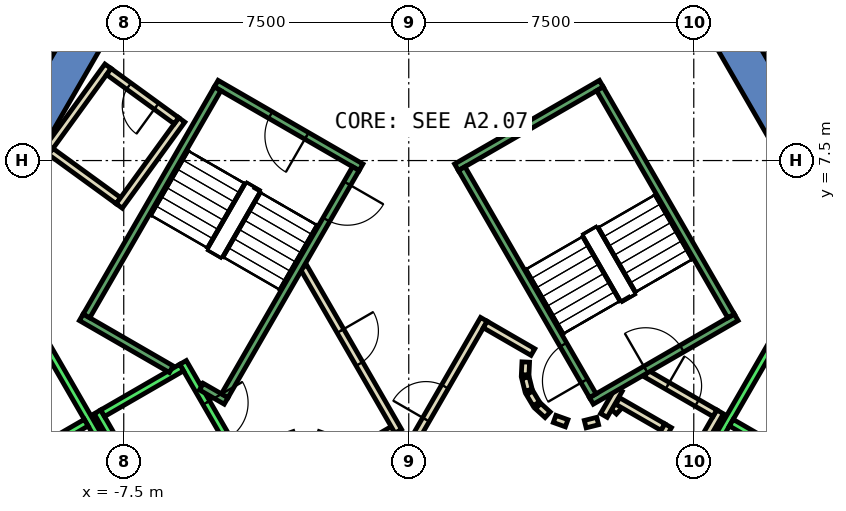
"""IFC4 building model, lengths in metres.
Left out: names, types, materials, properties, quantities, classifications, styles, units other than length and angle.
Written with IfcOpenShell. Run it as: python <this file> out.ifc"""

import sys

from ifc_helpers import new_model, si_unit, direction, frame, frame_2d, origin, place, context, subcontext, project, spatial, polyline, rectangle, outline, extrude, element, fill, save


model = new_model("IFC4")
c1 = context("Model", 3, precision=1e-05, world=origin(), true_north=direction((0.0, 1.0)))
c2 = subcontext(c1, "Body", "Model", "MODEL_VIEW")
j1 = project(units=[si_unit("LENGTHUNIT", "METRE"), si_unit("PLANEANGLEUNIT", "RADIAN")], contexts=[c1])
p1 = place(None, origin())
s1 = spatial("IfcSite", under=j1, at=p1, CompositionType="ELEMENT")
p2 = place(p1, origin())
s2 = spatial("IfcBuilding", under=s1, at=p2, CompositionType="ELEMENT")
p3 = place(p2, frame((0.0, 0.0, 20.0)))
s3 = spatial("IfcBuildingStorey", under=s2, at=p3, CompositionType="ELEMENT", Elevation=20.0)
p4 = place(p3, frame((0.0, 0.0, -0.45)))
e1 = element("IfcWall", 1, at=p4, inside=s3, PredefinedType="SHEAR", context=c2, shape_type="SweptSolid", body=[
    extrude(outline(polyline([(8.517, 11.748), (7.651, 11.248), (12.702, 2.5), (13.856, 2.5), (8.517, 11.748)])), origin(), (0.0, 0.0, 1.0), 5.0),
])
p5 = place(p3, frame((0.0, 0.0, -0.45)))
e2 = element("IfcWall", 2, at=p5, inside=s3, PredefinedType="SHEAR", context=c2, shape_type="SweptSolid", body=[
    extrude(outline(polyline([(-12.267, 5.252), (-11.402, 4.752), (-6.351, 13.5), (-6.928, 14.5), (-12.267, 5.252)])), origin(), (0.0, 0.0, 1.0), 5.0),
])
p6 = place(p3, frame((0.0, 0.0, -0.45)))
e3 = element("IfcWall", 3, at=p6, inside=s3, PredefinedType="SHEAR", context=c2, shape_type="SweptSolid", body=[
    extrude(outline(polyline([(-13.856, 2.5), (-6.928, -9.5), (-6.351, -8.5), (-12.702, 2.5), (-13.856, 2.5)])), origin(), (0.0, 0.0, 1.0), 5.0),
])
p7 = place(p3, frame((5.39, 0.898, 0.0), z_axis=(0.0, 0.0, 1.0), x_axis=(0.673828488714, 0.738887791073, 0.0)))
e4 = element("IfcWall", 4, at=p7, inside=s3, PredefinedType="PARTITIONING", context=c2, shape_type="SweptSolid", body=[
    extrude(rectangle(XDim=0.263, YDim=0.2, at=frame_2d((0.131, 0.0))), origin(), (0.0, 0.0, 1.0), 4.55),
])
p8 = place(p3, frame((5.499, 1.172, 0.0), z_axis=(0.0, 0.0, 1.0), x_axis=(0.866333505267, -0.499465972466, 0.0)))
e5 = element("IfcWall", 5, at=p8, inside=s3, PredefinedType="PARTITIONING", context=c2, shape_type="SweptSolid", body=[
    extrude(rectangle(XDim=1.374, YDim=0.2, at=frame_2d((0.687, 0.0))), origin(), (0.0, 0.0, 1.0), 4.55),
])
p9 = place(p3, frame((6.826, 0.522, 0.0), z_axis=(0.0, 0.0, 1.0), x_axis=(-0.500016722714, -0.866015748706, 0.0)))
e6 = element("IfcWall", 6, at=p9, inside=s3, PredefinedType="PARTITIONING", context=c2, shape_type="SweptSolid", body=[
    extrude(rectangle(XDim=1.7, YDim=0.2, at=frame_2d((0.85, 0.0))), origin(), (0.0, 0.0, 1.0), 4.55),
])
p10 = place(p3, frame((8.192, 0.888, 0.0), z_axis=(0.0, 0.0, 1.0), x_axis=(-0.499940625693, -0.866059680843, 0.0)))
e7 = element("IfcWall", 7, at=p10, inside=s3, PredefinedType="PARTITIONING", context=c2, shape_type="SweptSolid", body=[
    extrude(rectangle(XDim=2.68, YDim=0.2, at=frame_2d((1.34, 0.0))), origin(), (0.0, 0.0, 1.0), 4.55),
])
p11 = place(p3, frame((5.135, 0.793, 0.0), z_axis=(0.0, 0.0, 1.0), x_axis=(0.499526442893, 0.866298639529, 0.0)))
e8 = element("IfcWall", 8, at=p11, inside=s3, PredefinedType="PARTITIONING", context=c2, shape_type="SweptSolid", body=[
    extrude(rectangle(XDim=0.791, YDim=0.2, at=frame_2d((0.396, 0.0))), origin(), (0.0, 0.0, 1.0), 4.55),
])
p12 = place(p3, frame((6.25, 1.894, 0.0), z_axis=(0.0, 0.0, 1.0), x_axis=(0.866043184279, -0.499969202016, 0.0)))
e9 = element("IfcWall", 9, at=p12, inside=s3, PredefinedType="PARTITIONING", context=c2, shape_type="SweptSolid", body=[
    extrude(rectangle(XDim=2.084, YDim=0.2, at=frame_2d((1.042, 0.0))), origin(), (0.0, 0.0, 1.0), 4.55),
])
p13 = place(p12, frame((0.642, 0.0, 0.0)))
e10 = element("IfcOpeningElement", 10, at=p13, cuts=e9, PredefinedType="OPENING", context=c2, shape_type="SweptSolid", body=[
    extrude(rectangle(XDim=0.9, YDim=2.1, at=frame_2d((0.45, 1.05))), frame((0.0, 0.11, 0.0), z_axis=(0.0, -1.0, 0.0), x_axis=(1.0, 0.0, 0.0)), (0.0, 0.0, 1.0), 0.22),
])
p14 = place(p3, frame((-7.915, 9.981, 0.0), z_axis=(0.0, 0.0, 1.0), x_axis=(-0.587497525331, -0.809225962096, 0.0)))
e11 = element("IfcWall", 11, at=p14, inside=s3, PredefinedType="PARTITIONING", context=c2, shape_type="SweptSolid", body=[
    extrude(rectangle(XDim=2.8, YDim=0.2, at=frame_2d((1.4, 0.0))), origin(), (0.0, 0.0, 1.0), 4.55),
])
p15 = place(p3, frame((-9.421, 7.738, 0.0), z_axis=(0.0, 0.0, 1.0), x_axis=(0.808832031072, -0.588039748242, 0.0)))
e12 = element("IfcWall", 12, at=p15, inside=s3, PredefinedType="PARTITIONING", context=c2, shape_type="SweptSolid", body=[
    extrude(rectangle(XDim=2.2, YDim=0.2, at=frame_2d((1.1, 0.0))), origin(), (0.0, 0.0, 1.0), 4.55),
])
p16 = place(p3, frame((-7.619, 6.305, 0.0), z_axis=(0.0, 0.0, 1.0), x_axis=(0.58785021813, 0.808969789945, 0.0)))
e13 = element("IfcWall", 13, at=p16, inside=s3, PredefinedType="PARTITIONING", context=c2, shape_type="SweptSolid", body=[
    extrude(rectangle(XDim=2.8, YDim=0.2, at=frame_2d((1.4, 0.0))), origin(), (0.0, 0.0, 1.0), 4.55),
])
p17 = place(p3, frame((-6.113, 8.548, 0.0), z_axis=(0.0, 0.0, 1.0), x_axis=(-0.808928058073, 0.587907643139, 0.0)))
e14 = element("IfcWall", 14, at=p17, inside=s3, PredefinedType="PARTITIONING", context=c2, shape_type="SweptSolid", body=[
    extrude(rectangle(XDim=2.199, YDim=0.2, at=frame_2d((1.1, 0.0))), origin(), (0.0, 0.0, 1.0), 4.55),
])
p18 = place(p17, frame((0.65, 0.0, 0.0)))
e15 = element("IfcOpeningElement", 15, at=p18, cuts=e14, PredefinedType="OPENING", context=c2, shape_type="SweptSolid", body=[
    extrude(rectangle(XDim=0.9, YDim=2.1, at=frame_2d((0.45, 1.05))), frame((0.0, 0.11, 0.0), z_axis=(0.0, -1.0, 0.0), x_axis=(1.0, 0.0, 0.0)), (0.0, 0.0, 1.0), 0.22),
])
p19 = place(p3, frame((3.079, 2.199, 0.0), z_axis=(0.0, 0.0, 1.0), x_axis=(-0.047771483479, -0.998858290933, 0.0)))
e16 = element("IfcWall", 16, at=p19, inside=s3, PredefinedType="PARTITIONING", context=c2, shape_type="SweptSolid", body=[
    extrude(rectangle(XDim=0.337, YDim=0.2, at=frame_2d((0.169, 0.0))), origin(), (0.0, 0.0, 1.0), 4.55),
])
p20 = place(p3, frame((3.07, 1.786, 0.0), z_axis=(0.0, 0.0, 1.0), x_axis=(0.242705583207, -0.970099994784, 0.0)))
e17 = element("IfcWall", 17, at=p20, inside=s3, PredefinedType="PARTITIONING", context=c2, shape_type="SweptSolid", body=[
    extrude(rectangle(XDim=0.338, YDim=0.2, at=frame_2d((0.169, 0.0))), origin(), (0.0, 0.0, 1.0), 4.55),
])
for number, where, z_axis, x_axis in (
    (18, (3.182, 1.388, 0.0), (0.0, 0.0, 1.0), (0.512, -0.859, 0.0)),
    (19, (3.404, 1.039, 0.0), (0.0, 0.0, 1.0), (0.74, -0.672, 0.0)),
):
    element("IfcWall", number, at=place(p3, frame(where, z_axis=z_axis, x_axis=x_axis)), inside=s3, PredefinedType="PARTITIONING", context=c2, shape_type="SweptSolid", body=[
        extrude(rectangle(XDim=0.338, YDim=0.2, at=frame_2d((0.169, 0.0))), origin(), (0.0, 0.0, 1.0), 4.55),
    ])
p21 = place(p3, frame((3.838, 0.702, 0.0), z_axis=(0.0, 0.0, 1.0), x_axis=(0.941035081519, -0.338308993895, 0.0)))
e20 = element("IfcWall", 20, at=p21, inside=s3, PredefinedType="PARTITIONING", context=c2, shape_type="SweptSolid", body=[
    extrude(rectangle(XDim=0.337, YDim=0.2, at=frame_2d((0.168, 0.0))), origin(), (0.0, 0.0, 1.0), 4.55),
])
p22 = place(p3, frame((4.644, 0.564, 0.0), z_axis=(0.0, 0.0, 1.0), x_axis=(0.969929076366, 0.243387729394, 0.0)))
e21 = element("IfcWall", 21, at=p22, inside=s3, PredefinedType="PARTITIONING", context=c2, shape_type="SweptSolid", body=[
    extrude(rectangle(XDim=0.337, YDim=0.2, at=frame_2d((0.168, 0.0))), origin(), (0.0, 0.0, 1.0), 4.55),
])
p23 = place(p3, frame((-0.52, -1.0, 0.0), z_axis=(0.0, 0.0, 1.0), x_axis=(0.50011622646, 0.865958290007, 0.0)))
e22 = element("IfcWall", 22, at=p23, inside=s3, PredefinedType="PARTITIONING", context=c2, shape_type="SweptSolid", body=[
    extrude(rectangle(XDim=4.991, YDim=0.2, at=frame_2d((2.496, 0.0))), origin(), (0.0, 0.0, 1.0), 4.55),
])
p24 = place(p23, frame((1.945, 0.0, 0.0)))
e23 = element("IfcOpeningElement", 23, at=p24, cuts=e22, PredefinedType="OPENING", context=c2, shape_type="SweptSolid", body=[
    extrude(rectangle(XDim=1.0, YDim=2.1, at=frame_2d((0.5, 1.05))), frame((0.0, 0.11, 0.0), z_axis=(0.0, -1.0, 0.0), x_axis=(1.0, 0.0, 0.0)), (0.0, 0.0, 1.0), 0.22),
])
p25 = place(p3, frame((2.012, 3.186, 0.0), z_axis=(0.0, 0.0, 1.0), x_axis=(0.865891012941, -0.500232699559, 0.0)))
e24 = element("IfcWall", 24, at=p25, inside=s3, PredefinedType="PARTITIONING", context=c2, shape_type="SweptSolid", body=[
    extrude(rectangle(XDim=1.449, YDim=0.2, at=frame_2d((0.725, 0.0))), origin(), (0.0, 0.0, 1.0), 4.55),
])
p26 = place(p3, frame((-0.412, 0.414, 0.0), z_axis=(0.0, 0.0, 1.0), x_axis=(-0.866017369001, -0.500013916395, 0.0)))
e25 = element("IfcWall", 25, at=p26, inside=s3, PredefinedType="PARTITIONING", context=c2, shape_type="SweptSolid", body=[
    extrude(rectangle(XDim=1.45, YDim=0.2, at=frame_2d((0.725, 0.0))), origin(), (0.0, 0.0, 1.0), 4.55),
])
p27 = place(p3, frame((-2.07, 0.16, 0.0), z_axis=(0.0, 0.0, 1.0), x_axis=(-0.942199461132, 0.335052496547, 0.0)))
e26 = element("IfcWall", 26, at=p27, inside=s3, PredefinedType="PARTITIONING", context=c2, shape_type="SweptSolid", body=[
    extrude(rectangle(XDim=0.337, YDim=0.2, at=frame_2d((0.169, 0.0))), origin(), (0.0, 0.0, 1.0), 4.55),
])
p28 = place(p3, frame((-3.012, 0.273, 0.0), z_axis=(0.0, 0.0, 1.0), x_axis=(-0.942280615813, -0.334824194261, 0.0)))
e27 = element("IfcWall", 27, at=p28, inside=s3, PredefinedType="PARTITIONING", context=c2, shape_type="SweptSolid", body=[
    extrude(rectangle(XDim=0.338, YDim=0.2, at=frame_2d((0.169, 0.0))), origin(), (0.0, 0.0, 1.0), 4.55),
])
p29 = place(p3, frame((-2.771, 4.7, 0.0), z_axis=(0.0, 0.0, 1.0), x_axis=(0.499969479948, -0.866043023828, 0.0)))
e28 = element("IfcWall", 28, at=p29, inside=s3, PredefinedType="PARTITIONING", context=c2, shape_type="SweptSolid", body=[
    extrude(rectangle(XDim=4.99, YDim=0.2, at=frame_2d((2.495, 0.0))), origin(), (0.0, 0.0, 1.0), 4.55),
])
p30 = place(p29, frame((1.945, 0.0, 0.0)))
e29 = element("IfcOpeningElement", 29, at=p30, cuts=e28, PredefinedType="OPENING", context=c2, shape_type="SweptSolid", body=[
    extrude(rectangle(XDim=1.0, YDim=2.1, at=frame_2d((0.5, 1.05))), frame((0.0, 0.11, 0.0), z_axis=(0.0, -1.0, 0.0), x_axis=(1.0, 0.0, 0.0)), (0.0, 0.0, 1.0), 0.22),
])
p31 = place(p3, frame((-5.94, 2.188, 0.0), z_axis=(0.0, 0.0, 1.0), x_axis=(0.49994636267, -0.866056369097, 0.0)))
e30 = element("IfcWall", 30, at=p31, inside=s3, PredefinedType="STANDARD", context=c2, shape_type="SweptSolid", body=[
    extrude(rectangle(XDim=2.8, YDim=0.2, at=frame_2d((1.4, 0.0))), origin(), (0.0, 0.0, 1.0), 4.55),
])
p32 = place(p31, frame((1.225, 0.0, 0.0)))
e31 = element("IfcOpeningElement", 31, at=p32, cuts=e30, PredefinedType="OPENING", context=c2, shape_type="SweptSolid", body=[
    extrude(rectangle(XDim=1.1, YDim=2.1, at=frame_2d((0.55, 1.05))), frame((0.0, 0.11, 0.0), z_axis=(0.0, -1.0, 0.0), x_axis=(1.0, 0.0, 0.0)), (0.0, 0.0, 1.0), 0.22),
])
p33 = place(p3, frame((-8.192, 0.888, 0.0), z_axis=(0.0, 0.0, 1.0), x_axis=(0.49994636267, -0.866056369097, 0.0)))
e32 = element("IfcWall", 32, at=p33, inside=s3, PredefinedType="STANDARD", context=c2, shape_type="SweptSolid", body=[
    extrude(rectangle(XDim=2.8, YDim=0.2, at=frame_2d((1.4, 0.0))), origin(), (0.0, 0.0, 1.0), 4.55),
])
p34 = place(p3, frame((-5.977, 2.052, 0.0), z_axis=(0.0, 0.0, 1.0), x_axis=(-0.865973769406, -0.500089422704, 0.0)))
e33 = element("IfcWall", 33, at=p34, inside=s3, PredefinedType="STANDARD", context=c2, shape_type="SweptSolid", body=[
    extrude(rectangle(XDim=2.399, YDim=0.2, at=frame_2d((1.2, 0.0))), origin(), (0.0, 0.0, 1.0), 4.55),
])
p35 = place(p3, frame((-9.751, 2.99, 0.0), z_axis=(0.0, 0.0, 1.0), x_axis=(0.50000090737, -0.866024879913, 0.0)))
e34 = element("IfcWall", 34, at=p35, inside=s3, PredefinedType="STANDARD", context=c2, shape_type="SweptSolid", body=[
    extrude(rectangle(XDim=10.6, YDim=0.2, at=frame_2d((5.3, 0.0))), origin(), (0.0, 0.0, 1.0), 4.55),
])
p36 = place(p3, frame((-8.488, 0.602, 0.0), z_axis=(0.0, 0.0, 1.0), x_axis=(-0.866022959057, -0.500004234368, 0.0)))
e35 = element("IfcWall", 35, at=p36, inside=s3, PredefinedType="STANDARD", context=c2, shape_type="SweptSolid", body=[
    extrude(rectangle(XDim=2.5, YDim=0.2, at=frame_2d((1.25, 0.0))), origin(), (0.0, 0.0, 1.0), 4.55),
])
p37 = place(p3, frame((4.451, -6.19, 0.0), z_axis=(0.0, 0.0, 1.0), x_axis=(0.50000090737, 0.866024879913, 0.0)))
e36 = element("IfcWall", 36, at=p37, inside=s3, PredefinedType="STANDARD", context=c2, shape_type="SweptSolid", body=[
    extrude(rectangle(XDim=10.6, YDim=0.2, at=frame_2d((5.3, 0.0))), origin(), (0.0, 0.0, 1.0), 4.55),
])
p38 = place(p3, frame((8.488, 0.602, 0.0), z_axis=(0.0, 0.0, 1.0), x_axis=(0.866022959057, -0.500004234368, 0.0)))
e37 = element("IfcWall", 37, at=p38, inside=s3, PredefinedType="STANDARD", context=c2, shape_type="SweptSolid", body=[
    extrude(rectangle(XDim=2.5, YDim=0.2, at=frame_2d((1.25, 0.0))), origin(), (0.0, 0.0, 1.0), 4.55),
])
p39 = place(p3, frame((4.806, 1.176, 0.0), z_axis=(0.0, 0.0, 1.0), x_axis=(0.866059941101, 0.499940174841, 0.0)))
e38 = element("IfcWall", 38, at=p39, inside=s3, PredefinedType="STANDARD", context=c2, shape_type="SweptSolid", body=[
    extrude(rectangle(XDim=4.4, YDim=0.2, at=frame_2d((2.2, 0.0))), origin(), (0.0, 0.0, 1.0), 4.55),
])
p40 = place(p39, frame((1.65, 0.0, 0.0)))
e39 = element("IfcOpeningElement", 39, at=p40, cuts=e38, PredefinedType="OPENING", context=c2, shape_type="SweptSolid", body=[
    extrude(rectangle(XDim=1.1, YDim=2.2, at=frame_2d((0.55, 1.1))), frame((0.0, 0.11, 0.0), z_axis=(0.0, -1.0, 0.0), x_axis=(1.0, 0.0, 0.0)), (0.0, 0.0, 1.0), 0.22),
])
p41 = place(p3, frame((1.256, 7.324, 0.0), z_axis=(0.0, 0.0, 1.0), x_axis=(0.866046073146, 0.499964197906, 0.0)))
e40 = element("IfcWall", 40, at=p41, inside=s3, PredefinedType="STANDARD", context=c2, shape_type="SweptSolid", body=[
    extrude(rectangle(XDim=4.4, YDim=0.2, at=frame_2d((2.2, 0.0))), origin(), (0.0, 0.0, 1.0), 4.55),
])
p42 = place(p3, frame((4.843, 1.312, 0.0), z_axis=(0.0, 0.0, 1.0), x_axis=(-0.499963383562, 0.866046543262, 0.0)))
e41 = element("IfcWall", 41, at=p42, inside=s3, PredefinedType="STANDARD", context=c2, shape_type="SweptSolid", body=[
    extrude(rectangle(XDim=6.9, YDim=0.2, at=frame_2d((3.45, 0.0))), origin(), (0.0, 0.0, 1.0), 4.55),
])
p43 = place(p42, frame((0.45, 0.0, 0.0)))
e42 = element("IfcOpeningElement", 42, at=p43, cuts=e41, PredefinedType="OPENING", context=c2, shape_type="SweptSolid", body=[
    extrude(rectangle(XDim=1.1, YDim=2.2, at=frame_2d((0.55, 1.1))), frame((0.0, 0.11, 0.0), z_axis=(0.0, -1.0, 0.0), x_axis=(1.0, 0.0, 0.0)), (0.0, 0.0, 1.0), 0.22),
])
p44 = place(p3, frame((8.48, 3.412, 0.0), z_axis=(0.0, 0.0, 1.0), x_axis=(-0.499978703459, 0.866037698999, 0.0)))
e43 = element("IfcWall", 43, at=p44, inside=s3, PredefinedType="STANDARD", context=c2, shape_type="SweptSolid", body=[
    extrude(rectangle(XDim=6.9, YDim=0.2, at=frame_2d((3.45, 0.0))), origin(), (0.0, 0.0, 1.0), 4.55),
])
p45 = place(p3, frame((-1.256, 7.324, 0.0), z_axis=(0.0, 0.0, 1.0), x_axis=(-0.866046073146, 0.499964197906, 0.0)))
e44 = element("IfcWall", 44, at=p45, inside=s3, PredefinedType="STANDARD", context=c2, shape_type="SweptSolid", body=[
    extrude(rectangle(XDim=4.4, YDim=0.2, at=frame_2d((2.2, 0.0))), origin(), (0.0, 0.0, 1.0), 4.55),
])
p46 = place(p45, frame((1.65, 0.0, 0.0)))
e45 = element("IfcOpeningElement", 45, at=p46, cuts=e44, PredefinedType="OPENING", context=c2, shape_type="SweptSolid", body=[
    extrude(rectangle(XDim=1.1, YDim=2.2, at=frame_2d((0.55, 1.1))), frame((0.0, 0.11, 0.0), z_axis=(0.0, -1.0, 0.0), x_axis=(1.0, 0.0, 0.0)), (0.0, 0.0, 1.0), 0.22),
])
p47 = place(p3, frame((-6.25, 2.01, 0.0), z_axis=(0.0, 0.0, 1.0), x_axis=(-0.86611865017, 0.499838457731, 0.0)))
e46 = element("IfcWall", 46, at=p47, inside=s3, PredefinedType="STANDARD", context=c2, shape_type="SweptSolid", body=[
    extrude(rectangle(XDim=2.733, YDim=0.2, at=frame_2d((1.366, 0.0))), origin(), (0.0, 0.0, 1.0), 4.55),
])
p48 = place(p3, frame((-4.806, 1.176, 0.0), z_axis=(0.0, 0.0, 1.0), x_axis=(-0.866558586415, 0.499075361355, 0.0)))
e47 = element("IfcWall", 47, at=p48, inside=s3, PredefinedType="STANDARD", context=c2, shape_type="SweptSolid", body=[
    extrude(rectangle(XDim=0.751, YDim=0.2, at=frame_2d((0.376, 0.0))), origin(), (0.0, 0.0, 1.0), 4.55),
])
p49 = place(p3, frame((-1.393, 7.288, 0.0), z_axis=(0.0, 0.0, 1.0), x_axis=(-0.499963383562, -0.866046543262, 0.0)))
e48 = element("IfcWall", 48, at=p49, inside=s3, PredefinedType="STANDARD", context=c2, shape_type="SweptSolid", body=[
    extrude(rectangle(XDim=6.9, YDim=0.2, at=frame_2d((3.45, 0.0))), origin(), (0.0, 0.0, 1.0), 4.55),
])
p50 = place(p49, frame((0.45, 0.0, 0.0)))
e49 = element("IfcOpeningElement", 49, at=p50, cuts=e48, PredefinedType="OPENING", context=c2, shape_type="SweptSolid", body=[
    extrude(rectangle(XDim=1.1, YDim=2.2, at=frame_2d((0.55, 1.1))), frame((0.0, 0.11, 0.0), z_axis=(0.0, -1.0, 0.0), x_axis=(1.0, 0.0, 0.0)), (0.0, 0.0, 1.0), 0.22),
])
p51 = place(p3, frame((-5.03, 9.388, 0.0), z_axis=(0.0, 0.0, 1.0), x_axis=(-0.499978703459, -0.866037698999, 0.0)))
e50 = element("IfcWall", 50, at=p51, inside=s3, PredefinedType="STANDARD", context=c2, shape_type="SweptSolid", body=[
    extrude(rectangle(XDim=6.9, YDim=0.2, at=frame_2d((3.45, 0.0))), origin(), (0.0, 0.0, 1.0), 4.55),
])
p52 = place(p24, origin())
e51 = element("IfcDoor", 51, at=p52, inside=s3, OperationType="SINGLE_SWING_LEFT", PredefinedType="DOOR", context=c2, shape_type="SweptSolid", body=[
    extrude(rectangle(XDim=1.0, YDim=2.1, at=frame_2d((0.5, 1.05))), frame((0.0, 0.025, 0.0), z_axis=(0.0, -1.0, 0.0), x_axis=(1.0, 0.0, 0.0)), (0.0, 0.0, 1.0), 0.05),
])
fill(e23, e51)
p53 = place(p30, origin())
e52 = element("IfcDoor", 52, at=p53, inside=s3, OperationType="SINGLE_SWING_RIGHT", PredefinedType="DOOR", context=c2, shape_type="SweptSolid", body=[
    extrude(rectangle(XDim=1.0, YDim=2.1, at=frame_2d((0.5, 1.05))), frame((0.0, 0.025, 0.0), z_axis=(0.0, -1.0, 0.0), x_axis=(1.0, 0.0, 0.0)), (0.0, 0.0, 1.0), 0.05),
])
fill(e29, e52)
p54 = place(p13, origin())
e53 = element("IfcDoor", 53, at=p54, inside=s3, OperationType="SINGLE_SWING_LEFT", PredefinedType="DOOR", context=c2, shape_type="SweptSolid", body=[
    extrude(rectangle(XDim=0.9, YDim=2.1, at=frame_2d((0.45, 1.05))), frame((0.0, 0.025, 0.0), z_axis=(0.0, -1.0, 0.0), x_axis=(1.0, 0.0, 0.0)), (0.0, 0.0, 1.0), 0.05),
])
fill(e10, e53)
p55 = place(p18, origin())
e54 = element("IfcDoor", 54, at=p55, inside=s3, OperationType="SINGLE_SWING_LEFT", PredefinedType="DOOR", context=c2, shape_type="SweptSolid", body=[
    extrude(rectangle(XDim=0.9, YDim=2.1, at=frame_2d((0.45, 1.05))), frame((0.0, 0.025, 0.0), z_axis=(0.0, -1.0, 0.0), x_axis=(1.0, 0.0, 0.0)), (0.0, 0.0, 1.0), 0.05),
])
fill(e15, e54)
p56 = place(p32, origin())
e55 = element("IfcDoor", 55, at=p56, inside=s3, OperationType="SLIDING_TO_LEFT", PredefinedType="DOOR", context=c2, shape_type="SweptSolid", body=[
    extrude(rectangle(XDim=1.1, YDim=2.1, at=frame_2d((0.55, 1.05))), frame((0.0, 0.025, 0.0), z_axis=(0.0, -1.0, 0.0), x_axis=(1.0, 0.0, 0.0)), (0.0, 0.0, 1.0), 0.05),
])
fill(e31, e55)
p57 = place(p43, origin())
e56 = element("IfcDoor", 56, at=p57, inside=s3, OperationType="SINGLE_SWING_LEFT", PredefinedType="DOOR", context=c2, shape_type="SweptSolid", body=[
    extrude(rectangle(XDim=1.1, YDim=2.2, at=frame_2d((0.55, 1.1))), frame((0.0, 0.025, 0.0), z_axis=(0.0, -1.0, 0.0), x_axis=(1.0, 0.0, 0.0)), (0.0, 0.0, 1.0), 0.05),
])
fill(e42, e56)
p58 = place(p40, origin())
e57 = element("IfcDoor", 57, at=p58, inside=s3, OperationType="SINGLE_SWING_LEFT", PredefinedType="DOOR", context=c2, shape_type="SweptSolid", body=[
    extrude(rectangle(XDim=1.1, YDim=2.2, at=frame_2d((0.55, 1.1))), frame((0.0, 0.025, 0.0), z_axis=(0.0, -1.0, 0.0), x_axis=(1.0, 0.0, 0.0)), (0.0, 0.0, 1.0), 0.05),
])
fill(e39, e57)
p59 = place(p50, origin())
e58 = element("IfcDoor", 58, at=p59, inside=s3, OperationType="SINGLE_SWING_LEFT", PredefinedType="DOOR", context=c2, shape_type="SweptSolid", body=[
    extrude(rectangle(XDim=1.1, YDim=2.2, at=frame_2d((0.55, 1.1))), frame((0.0, 0.025, 0.0), z_axis=(0.0, -1.0, 0.0), x_axis=(1.0, 0.0, 0.0)), (0.0, 0.0, 1.0), 0.05),
])
fill(e49, e58)
p60 = place(p46, origin())
e59 = element("IfcDoor", 59, at=p60, inside=s3, OperationType="SINGLE_SWING_LEFT", PredefinedType="DOOR", context=c2, shape_type="SweptSolid", body=[
    extrude(rectangle(XDim=1.1, YDim=2.2, at=frame_2d((0.55, 1.1))), frame((0.0, 0.025, 0.0), z_axis=(0.0, -1.0, 0.0), x_axis=(1.0, 0.0, 0.0)), (0.0, 0.0, 1.0), 0.05),
])
fill(e45, e59)
save(model, sys.argv[1])
